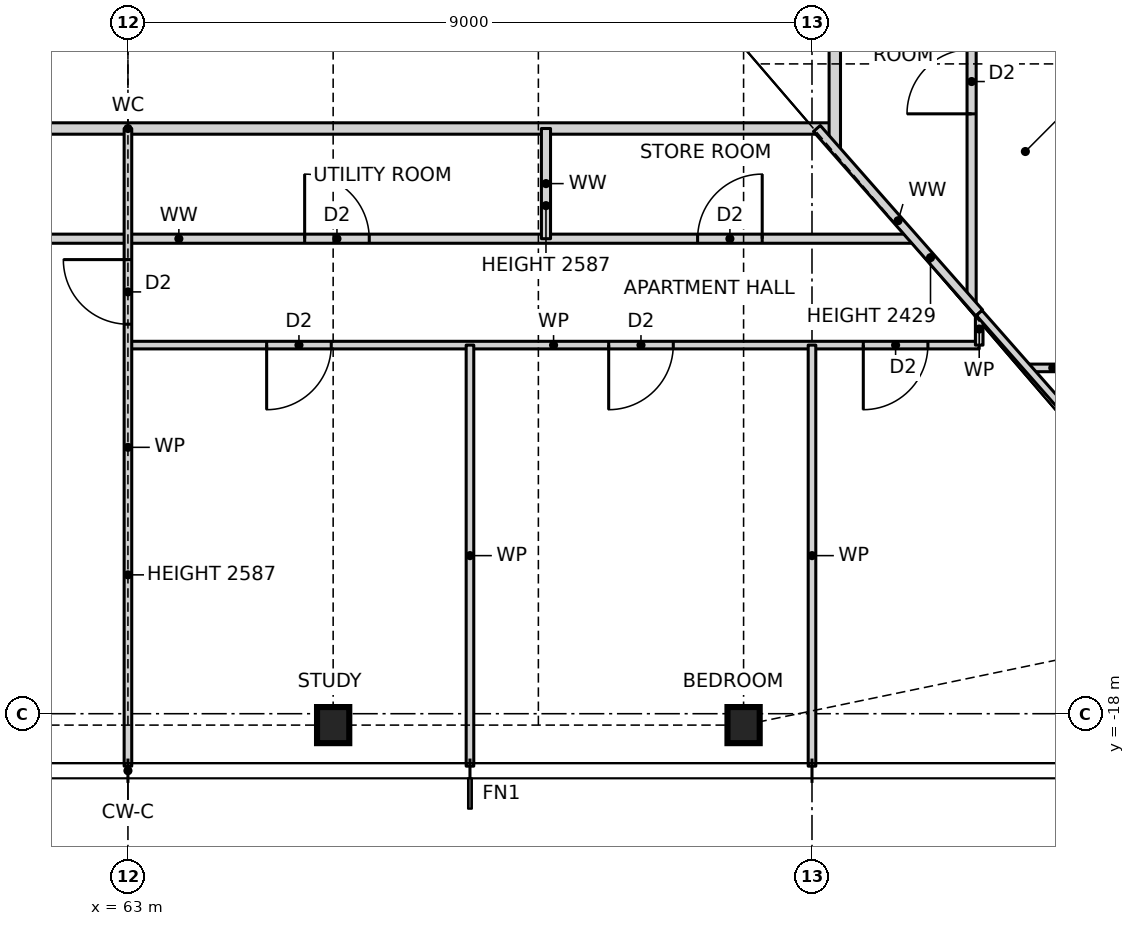
"""IFC4 building model, lengths in metres.
Left out: names, types, materials, properties, quantities, classifications, styles, units other than length and angle.
Written with IfcOpenShell. Run it as: python <this file> out.ifc"""

import sys

from ifc_helpers import new_model, si_unit, direction, frame, frame_2d, origin, origin_2d, place, context, subcontext, project, spatial, rectangle, i_section, extrude, element, fill, save


model = new_model("IFC4")
c1 = context("Model", 3, precision=1e-05, world=origin(), true_north=direction((0.0, 1.0)))
c2 = subcontext(c1, "Body", "Model", "MODEL_VIEW")
j1 = project(units=[si_unit("LENGTHUNIT", "METRE"), si_unit("PLANEANGLEUNIT", "RADIAN")], contexts=[c1])
p1 = place(None, origin())
s1 = spatial("IfcSite", under=j1, at=p1, CompositionType="ELEMENT")
p2 = place(p1, origin())
s2 = spatial("IfcBuilding", under=s1, at=p2, CompositionType="ELEMENT")
p3 = place(p2, frame((0.0, 0.0, 50.0)))
s3 = spatial("IfcBuildingStorey", under=s2, at=p3, CompositionType="ELEMENT", Elevation=50.0)
for number, where, z_axis, x_axis in (
    (1, (65.7, -18.15, 0.0), (0.0, 0.0, 1.0), (1.0, 0.0, 0.0)),
    (2, (71.1, -18.15, 0.0), (0.0, 0.0, 1.0), (1.0, 0.0, 0.0)),
):
    element("IfcColumn", number, at=place(p3, frame(where, z_axis=z_axis, x_axis=x_axis)), inside=s3, PredefinedType="COLUMN", context=c2, shape_type="SweptSolid", body=[
        extrude(i_section(OverallWidth=0.424, OverallDepth=0.475, WebThickness=0.048, FlangeThickness=0.077, at=origin_2d()), origin(), (0.0, 0.0, 1.0), 3.5),
    ])
p4 = place(p3, frame((74.836, -13.45, 0.0), z_axis=(0.0, 0.0, 1.0), x_axis=(1.0, 0.0, 0.0)))
e3 = element("IfcWall", 3, at=p4, inside=s3, PredefinedType="PARTITIONING", context=c2, shape_type="SweptSolid", body=[
    extrude(rectangle(XDim=0.664, YDim=0.1, at=frame_2d((0.332, 0.0))), origin(), (0.0, 0.0, 1.0), 3.27),
])
p5 = place(p3, frame((63.0, -13.15, 0.0), z_axis=(0.0, 0.0, 1.0), x_axis=(1.0, 0.0, 0.0)))
e4 = element("IfcWall", 4, at=p5, inside=s3, PredefinedType="PARTITIONING", context=c2, shape_type="SweptSolid", body=[
    extrude(rectangle(XDim=11.2, YDim=0.1, at=frame_2d((5.6, 0.0))), origin(), (0.0, 0.0, 1.0), 3.27),
])
p6 = place(p5, frame((1.825, 0.0, 0.0)))
e5 = element("IfcOpeningElement", 5, at=p6, cuts=e4, PredefinedType="OPENING", context=c2, shape_type="SweptSolid", body=[
    extrude(rectangle(XDim=0.85, YDim=2.1, at=frame_2d((0.425, 1.05))), frame((0.0, 0.06, 0.0), z_axis=(0.0, -1.0, 0.0), x_axis=(1.0, 0.0, 0.0)), (0.0, 0.0, 1.0), 0.12),
])
p7 = place(p5, frame((6.325, 0.0, 0.0)))
e6 = element("IfcOpeningElement", 6, at=p7, cuts=e4, PredefinedType="OPENING", context=c2, shape_type="SweptSolid", body=[
    extrude(rectangle(XDim=0.85, YDim=2.1, at=frame_2d((0.425, 1.05))), frame((0.0, 0.06, 0.0), z_axis=(0.0, -1.0, 0.0), x_axis=(1.0, 0.0, 0.0)), (0.0, 0.0, 1.0), 0.12),
])
p8 = place(p5, frame((9.675, 0.0, 0.0)))
e7 = element("IfcOpeningElement", 7, at=p8, cuts=e4, PredefinedType="OPENING", context=c2, shape_type="SweptSolid", body=[
    extrude(rectangle(XDim=0.85, YDim=2.1, at=frame_2d((0.425, 1.05))), frame((0.0, 0.06, 0.0), z_axis=(0.0, -1.0, 0.0), x_axis=(1.0, 0.0, 0.0)), (0.0, 0.0, 1.0), 0.12),
])
p9 = place(p3, frame((54.0, -11.75, 0.0), z_axis=(0.0, 0.0, 1.0), x_axis=(1.0, 0.0, 0.0)))
e8 = element("IfcWall", 8, at=p9, inside=s3, PredefinedType="PARTITIONING", context=c2, shape_type="SweptSolid", body=[
    extrude(rectangle(XDim=19.34, YDim=0.12, at=frame_2d((9.67, 0.0))), origin(), (0.0, 0.0, 1.0), 3.27),
])
p10 = place(p9, frame((1.375, 0.0, 0.0)))
e9 = element("IfcOpeningElement", 9, at=p10, cuts=e8, PredefinedType="OPENING", context=c2, shape_type="SweptSolid", body=[
    extrude(rectangle(XDim=0.85, YDim=2.1, at=frame_2d((0.425, 1.05))), frame((0.0, 0.07, 0.0), z_axis=(0.0, -1.0, 0.0), x_axis=(1.0, 0.0, 0.0)), (0.0, 0.0, 1.0), 0.14),
])
p11 = place(p9, frame((4.575, 0.0, 0.0)))
e10 = element("IfcOpeningElement", 10, at=p11, cuts=e8, PredefinedType="OPENING", context=c2, shape_type="SweptSolid", body=[
    extrude(rectangle(XDim=0.85, YDim=2.1, at=frame_2d((0.425, 1.05))), frame((0.0, 0.07, 0.0), z_axis=(0.0, -1.0, 0.0), x_axis=(1.0, 0.0, 0.0)), (0.0, 0.0, 1.0), 0.14),
])
p12 = place(p9, frame((11.325, 0.0, 0.0)))
e11 = element("IfcOpeningElement", 11, at=p12, cuts=e8, PredefinedType="OPENING", context=c2, shape_type="SweptSolid", body=[
    extrude(rectangle(XDim=0.85, YDim=2.1, at=frame_2d((0.425, 1.05))), frame((0.0, 0.07, 0.0), z_axis=(0.0, -1.0, 0.0), x_axis=(1.0, 0.0, 0.0)), (0.0, 0.0, 1.0), 0.14),
])
p13 = place(p9, frame((16.495, 0.0, 0.0)))
e12 = element("IfcOpeningElement", 12, at=p13, cuts=e8, PredefinedType="OPENING", context=c2, shape_type="SweptSolid", body=[
    extrude(rectangle(XDim=0.85, YDim=2.1, at=frame_2d((0.425, 1.05))), frame((0.0, 0.07, 0.0), z_axis=(0.0, -1.0, 0.0), x_axis=(1.0, 0.0, 0.0)), (0.0, 0.0, 1.0), 0.14),
])
p14 = place(p3, frame((53.7, -10.3, 0.0), z_axis=(0.0, 0.0, 1.0), x_axis=(1.0, 0.0, 0.0)))
e13 = element("IfcWall", 13, at=p14, inside=s3, PredefinedType="PARTITIONING", context=c2, shape_type="SweptSolid", body=[
    extrude(rectangle(XDim=18.6, YDim=0.15, at=frame_2d((9.3, 0.0))), origin(), (0.0, 0.0, 1.0), 3.27),
])
p15 = place(p14, frame((4.8, 0.0, 0.0)))
e14 = element("IfcOpeningElement", 14, at=p15, cuts=e13, PredefinedType="OPENING", context=c2, shape_type="SweptSolid", body=[
    extrude(rectangle(XDim=1.0, YDim=2.1, at=frame_2d((0.5, 1.05))), frame((0.0, 0.085, 0.0), z_axis=(0.0, -1.0, 0.0), x_axis=(1.0, 0.0, 0.0)), (0.0, 0.0, 1.0), 0.17),
])
p16 = place(p3, frame((74.2, -13.15, 0.0), z_axis=(0.0, 0.0, 1.0), x_axis=(0.0, 1.0, 0.0)))
e15 = element("IfcWall", 15, at=p16, inside=s3, PredefinedType="PARTITIONING", context=c2, shape_type="SweptSolid", body=[
    extrude(rectangle(XDim=0.423, YDim=0.1, at=frame_2d((0.211, 0.0))), origin(), (0.0, 0.0, 1.0), 3.27),
])
p17 = place(p3, frame((74.1, -12.614, 0.0), z_axis=(0.0, 0.0, 1.0), x_axis=(0.0, 1.0, 0.0)))
e16 = element("IfcWall", 16, at=p17, inside=s3, PredefinedType="PARTITIONING", context=c2, shape_type="SweptSolid", body=[
    extrude(rectangle(XDim=25.228, YDim=0.12, at=frame_2d((12.614, 0.0))), origin(), (0.0, 0.0, 1.0), 3.27),
])
p18 = place(p17, frame((7.239, 0.0, 0.0)))
e17 = element("IfcOpeningElement", 17, at=p18, cuts=e16, PredefinedType="OPENING", context=c2, shape_type="SweptSolid", body=[
    extrude(rectangle(XDim=0.85, YDim=2.1, at=frame_2d((0.425, 1.05))), frame((0.0, 0.07, 0.0), z_axis=(0.0, -1.0, 0.0), x_axis=(1.0, 0.0, 0.0)), (0.0, 0.0, 1.0), 0.14),
])
p19 = place(p17, frame((10.439, 0.0, 0.0)))
e18 = element("IfcOpeningElement", 18, at=p19, cuts=e16, PredefinedType="OPENING", context=c2, shape_type="SweptSolid", body=[
    extrude(rectangle(XDim=0.85, YDim=2.1, at=frame_2d((0.425, 1.05))), frame((0.0, 0.07, 0.0), z_axis=(0.0, -1.0, 0.0), x_axis=(1.0, 0.0, 0.0)), (0.0, 0.0, 1.0), 0.14),
])
p20 = place(p17, frame((2.507, 0.0, 0.0)))
e19 = element("IfcOpeningElement", 19, at=p20, cuts=e16, PredefinedType="OPENING", context=c2, shape_type="SweptSolid", body=[
    extrude(rectangle(XDim=0.85, YDim=2.1, at=frame_2d((0.425, 1.05))), frame((0.0, 0.07, 0.0), z_axis=(0.0, -1.0, 0.0), x_axis=(1.0, 0.0, 0.0)), (0.0, 0.0, 1.0), 0.14),
])
p21 = place(p17, frame((16.639, 0.0, 0.0)))
e20 = element("IfcOpeningElement", 20, at=p21, cuts=e16, PredefinedType="OPENING", context=c2, shape_type="SweptSolid", body=[
    extrude(rectangle(XDim=0.85, YDim=2.1, at=frame_2d((0.425, 1.05))), frame((0.0, 0.07, 0.0), z_axis=(0.0, -1.0, 0.0), x_axis=(1.0, 0.0, 0.0)), (0.0, 0.0, 1.0), 0.14),
])
p22 = place(p17, frame((21.821, 0.0, 0.0)))
e21 = element("IfcOpeningElement", 21, at=p22, cuts=e16, PredefinedType="OPENING", context=c2, shape_type="SweptSolid", body=[
    extrude(rectangle(XDim=0.85, YDim=2.1, at=frame_2d((0.425, 1.05))), frame((0.0, 0.07, 0.0), z_axis=(0.0, -1.0, 0.0), x_axis=(1.0, 0.0, 0.0)), (0.0, 0.0, 1.0), 0.14),
])
p23 = place(p3, frame((72.3, -10.568, 0.0), z_axis=(0.0, 0.0, 1.0), x_axis=(0.0, 1.0, 0.0)))
e22 = element("IfcWall", 22, at=p23, inside=s3, PredefinedType="PARTITIONING", context=c2, shape_type="SweptSolid", body=[
    extrude(rectangle(XDim=21.136, YDim=0.15, at=frame_2d((10.568, 0.0))), origin(), (0.0, 0.0, 1.0), 3.27),
])
p24 = place(p23, frame((8.318, 0.0, 0.0)))
e23 = element("IfcOpeningElement", 23, at=p24, cuts=e22, PredefinedType="OPENING", context=c2, shape_type="SweptSolid", body=[
    extrude(rectangle(XDim=1.0, YDim=2.1, at=frame_2d((0.5, 1.05))), frame((0.0, 0.085, 0.0), z_axis=(0.0, -1.0, 0.0), x_axis=(1.0, 0.0, 0.0)), (0.0, 0.0, 1.0), 0.17),
])
p25 = place(p3, frame((72.0, -18.69, 0.0), z_axis=(0.0, 0.0, 1.0), x_axis=(0.0, 1.0, 0.0)))
e24 = element("IfcWall", 24, at=p25, inside=s3, PredefinedType="PARTITIONING", context=c2, shape_type="SweptSolid", body=[
    extrude(rectangle(XDim=5.54, YDim=0.1, at=frame_2d((2.77, 0.0))), origin(), (0.0, 0.0, 1.0), 3.27),
])
p26 = place(p3, frame((68.5, -11.75, 0.0), z_axis=(0.0, 0.0, 1.0), x_axis=(0.0, 1.0, 0.0)))
e25 = element("IfcWall", 25, at=p26, inside=s3, PredefinedType="PARTITIONING", context=c2, shape_type="SweptSolid", body=[
    extrude(rectangle(XDim=1.45, YDim=0.12, at=frame_2d((0.725, 0.0))), origin(), (0.0, 0.0, 1.0), 2.587),
])
p27 = place(p3, frame((67.5, -18.69, 0.0), z_axis=(0.0, 0.0, 1.0), x_axis=(0.0, 1.0, 0.0)))
e26 = element("IfcWall", 26, at=p27, inside=s3, PredefinedType="PARTITIONING", context=c2, shape_type="SweptSolid", body=[
    extrude(rectangle(XDim=5.54, YDim=0.1, at=frame_2d((2.77, 0.0))), origin(), (0.0, 0.0, 1.0), 3.27),
])
p28 = place(p3, frame((63.0, -18.69, 0.0), z_axis=(0.0, 0.0, 1.0), x_axis=(0.0, 1.0, 0.0)))
e27 = element("IfcWall", 27, at=p28, inside=s3, PredefinedType="PARTITIONING", context=c2, shape_type="SweptSolid", body=[
    extrude(rectangle(XDim=8.39, YDim=0.1, at=frame_2d((4.195, 0.0))), origin(), (0.0, 0.0, 1.0), 2.587),
])
p29 = place(p28, frame((5.815, 0.0, 0.0)))
e28 = element("IfcOpeningElement", 28, at=p29, cuts=e27, PredefinedType="OPENING", context=c2, shape_type="SweptSolid", body=[
    extrude(rectangle(XDim=0.85, YDim=2.1, at=frame_2d((0.425, 1.05))), frame((0.0, 0.06, 0.0), z_axis=(0.0, -1.0, 0.0), x_axis=(1.0, 0.0, 0.0)), (0.0, 0.0, 1.0), 0.12),
])
p30 = place(p3, frame((74.2, -12.727, 0.0), z_axis=(0.0, 0.0, 1.0), x_axis=(-0.660667046586, 0.75067906162, 0.0)))
e29 = element("IfcWall", 29, at=p30, inside=s3, PredefinedType="PARTITIONING", context=c2, shape_type="SweptSolid", body=[
    extrude(rectangle(XDim=3.233, YDim=0.12, at=frame_2d((1.617, 0.0))), origin(), (0.0, 0.0, 1.0), 2.429),
])
p31 = place(p3, frame((78.057, -17.109, 0.0), z_axis=(0.0, 0.0, 1.0), x_axis=(-0.660698595885, 0.750651294141, 0.0)))
e30 = element("IfcWall", 30, at=p31, inside=s3, PredefinedType="PARTITIONING", context=c2, shape_type="SweptSolid", body=[
    extrude(rectangle(XDim=5.838, YDim=0.1, at=frame_2d((2.919, 0.0))), origin(), (0.0, 0.0, 1.0), 2.429),
])
p32 = place(p29, origin())
e31 = element("IfcDoor", 31, at=p32, inside=s3, OperationType="SINGLE_SWING_RIGHT", PredefinedType="DOOR", context=c2, shape_type="SweptSolid", body=[
    extrude(rectangle(XDim=0.85, YDim=2.1, at=frame_2d((0.425, 1.05))), frame((0.0, 0.025, 0.0), z_axis=(0.0, -1.0, 0.0), x_axis=(1.0, 0.0, 0.0)), (0.0, 0.0, 1.0), 0.05),
])
fill(e28, e31)
p33 = place(p6, frame((0.85, 0.0, 0.0), z_axis=(0.0, 0.0, 1.0), x_axis=(-1.0, 0.0, 0.0)))
e32 = element("IfcDoor", 32, at=p33, inside=s3, OperationType="SINGLE_SWING_RIGHT", PredefinedType="DOOR", context=c2, shape_type="SweptSolid", body=[
    extrude(rectangle(XDim=0.85, YDim=2.1, at=frame_2d((0.425, 1.05))), frame((0.0, 0.025, 0.0), z_axis=(0.0, -1.0, 0.0), x_axis=(1.0, 0.0, 0.0)), (0.0, 0.0, 1.0), 0.05),
])
fill(e5, e32)
p34 = place(p7, frame((0.85, 0.0, 0.0), z_axis=(0.0, 0.0, 1.0), x_axis=(-1.0, 0.0, 0.0)))
e33 = element("IfcDoor", 33, at=p34, inside=s3, OperationType="SINGLE_SWING_RIGHT", PredefinedType="DOOR", context=c2, shape_type="SweptSolid", body=[
    extrude(rectangle(XDim=0.85, YDim=2.1, at=frame_2d((0.425, 1.05))), frame((0.0, 0.025, 0.0), z_axis=(0.0, -1.0, 0.0), x_axis=(1.0, 0.0, 0.0)), (0.0, 0.0, 1.0), 0.05),
])
fill(e6, e33)
p35 = place(p8, frame((0.85, 0.0, 0.0), z_axis=(0.0, 0.0, 1.0), x_axis=(-1.0, 0.0, 0.0)))
e34 = element("IfcDoor", 34, at=p35, inside=s3, OperationType="SINGLE_SWING_RIGHT", PredefinedType="DOOR", context=c2, shape_type="SweptSolid", body=[
    extrude(rectangle(XDim=0.85, YDim=2.1, at=frame_2d((0.425, 1.05))), frame((0.0, 0.025, 0.0), z_axis=(0.0, -1.0, 0.0), x_axis=(1.0, 0.0, 0.0)), (0.0, 0.0, 1.0), 0.05),
])
fill(e7, e34)
p36 = place(p12, origin())
e35 = element("IfcDoor", 35, at=p36, inside=s3, OperationType="SINGLE_SWING_LEFT", PredefinedType="DOOR", context=c2, shape_type="SweptSolid", body=[
    extrude(rectangle(XDim=0.85, YDim=2.1, at=frame_2d((0.425, 1.05))), frame((0.0, 0.025, 0.0), z_axis=(0.0, -1.0, 0.0), x_axis=(1.0, 0.0, 0.0)), (0.0, 0.0, 1.0), 0.05),
])
fill(e11, e35)
p37 = place(p13, origin())
e36 = element("IfcDoor", 36, at=p37, inside=s3, OperationType="SINGLE_SWING_RIGHT", PredefinedType="DOOR", context=c2, shape_type="SweptSolid", body=[
    extrude(rectangle(XDim=0.85, YDim=2.1, at=frame_2d((0.425, 1.05))), frame((0.0, 0.025, 0.0), z_axis=(0.0, -1.0, 0.0), x_axis=(1.0, 0.0, 0.0)), (0.0, 0.0, 1.0), 0.05),
])
fill(e12, e36)
p38 = place(p20, origin())
e37 = element("IfcDoor", 37, at=p38, inside=s3, OperationType="SINGLE_SWING_LEFT", PredefinedType="DOOR", context=c2, shape_type="SweptSolid", body=[
    extrude(rectangle(XDim=0.85, YDim=2.1, at=frame_2d((0.425, 1.05))), frame((0.0, 0.025, 0.0), z_axis=(0.0, -1.0, 0.0), x_axis=(1.0, 0.0, 0.0)), (0.0, 0.0, 1.0), 0.05),
])
fill(e19, e37)
save(model, sys.argv[1])
